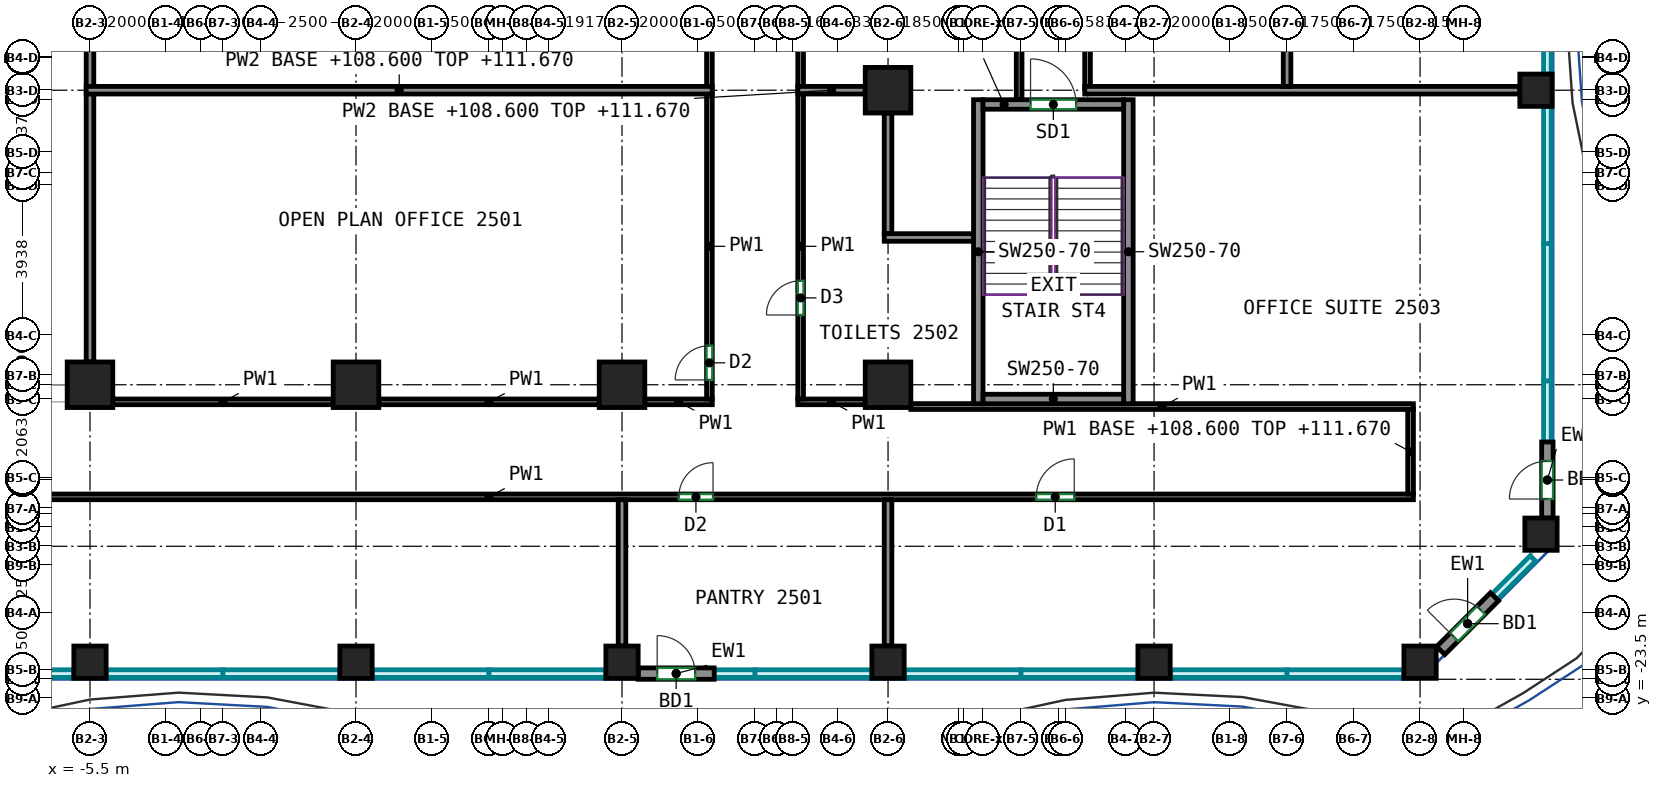
"""IFC4 building model, lengths in metres.
Left out: names, types, materials, properties, quantities, classifications, styles, units other than length and angle.
Written with IfcOpenShell. Run it as: python <this file> out.ifc"""

import sys

from ifc_helpers import new_model, si_unit, direction, frame, frame_2d, origin, origin_2d, place, context, subcontext, project, spatial, rectangle, extrude, source, transform, mapped, element, fill, save


model = new_model("IFC4")
c1 = context("Model", 3, precision=1e-05, world=origin(), true_north=direction((0.0, 1.0)))
c2 = subcontext(c1, "Body", "Model", "MODEL_VIEW")
j1 = project(units=[si_unit("LENGTHUNIT", "METRE"), si_unit("PLANEANGLEUNIT", "RADIAN")], contexts=[c1])
p1 = place(None, origin())
s1 = spatial("IfcSite", under=j1, at=p1, CompositionType="ELEMENT")
p2 = place(p1, origin())
s2 = spatial("IfcBuilding", under=s1, at=p2, CompositionType="ELEMENT")
p3 = place(p2, frame((0.0, 0.0, 108.6)))
s3 = spatial("IfcBuildingStorey", under=s2, at=p3, CompositionType="ELEMENT", Elevation=108.6)
m1 = source(origin(), c2, "Body", "SweptSolid", [
    extrude(rectangle(XDim=0.85, YDim=0.85, at=origin_2d()), origin(), (0.0, 0.0, 1.0), 3.72),
])
p4 = place(p3, frame((-5.5, -22.55, 0.0), z_axis=(0.0, 0.0, 1.0), x_axis=(1.0, 0.0, 0.0)))
e1 = element("IfcColumn", 1, at=p4, inside=s3, PredefinedType="COLUMN", context=c2, shape_type="MappedRepresentation", body=[
    mapped(m1, transform((0.0, 0.0, 0.0))),
])
m2 = source(origin(), c2, "Body", "SweptSolid", [
    extrude(rectangle(XDim=1.2, YDim=1.2, at=origin_2d()), origin(), (0.0, 0.0, 1.0), 3.72),
])
p5 = place(p3, frame((-5.5, -15.25, 0.0), z_axis=(0.0, 0.0, 1.0), x_axis=(1.0, 0.0, 0.0)))
e2 = element("IfcColumn", 2, at=p5, inside=s3, PredefinedType="COLUMN", context=c2, shape_type="MappedRepresentation", body=[
    mapped(m2, transform((0.0, 0.0, 0.0))),
])
p6 = place(p3, frame((1.5, -22.55, 0.0), z_axis=(0.0, 0.0, 1.0), x_axis=(1.0, 0.0, 0.0)))
e3 = element("IfcColumn", 3, at=p6, inside=s3, PredefinedType="COLUMN", context=c2, shape_type="MappedRepresentation", body=[
    mapped(m1, transform((0.0, 0.0, 0.0))),
])
p7 = place(p3, frame((1.5, -15.25, 0.0), z_axis=(0.0, 0.0, 1.0), x_axis=(1.0, 0.0, 0.0)))
e4 = element("IfcColumn", 4, at=p7, inside=s3, PredefinedType="COLUMN", context=c2, shape_type="MappedRepresentation", body=[
    mapped(m2, transform((0.0, 0.0, 0.0))),
])
p8 = place(p3, frame((8.5, -22.55, 0.0), z_axis=(0.0, 0.0, 1.0), x_axis=(1.0, 0.0, 0.0)))
e5 = element("IfcColumn", 5, at=p8, inside=s3, PredefinedType="COLUMN", context=c2, shape_type="MappedRepresentation", body=[
    mapped(m1, transform((0.0, 0.0, 0.0))),
])
p9 = place(p3, frame((8.5, -15.25, 0.0), z_axis=(0.0, 0.0, 1.0), x_axis=(1.0, 0.0, 0.0)))
e6 = element("IfcColumn", 6, at=p9, inside=s3, PredefinedType="COLUMN", context=c2, shape_type="MappedRepresentation", body=[
    mapped(m2, transform((0.0, 0.0, 0.0))),
])
p10 = place(p3, frame((15.5, -22.55, 0.0), z_axis=(0.0, 0.0, 1.0), x_axis=(1.0, 0.0, 0.0)))
e7 = element("IfcColumn", 7, at=p10, inside=s3, PredefinedType="COLUMN", context=c2, shape_type="MappedRepresentation", body=[
    mapped(m1, transform((0.0, 0.0, 0.0))),
])
for number, where, z_axis, x_axis in (
    (8, (15.5, -15.25, 0.0), (0.0, 0.0, 1.0), (1.0, 0.0, 0.0)),
    (9, (15.5, -7.5, 0.0), (0.0, 0.0, 1.0), (1.0, 0.0, 0.0)),
):
    element("IfcColumn", number, at=place(p3, frame(where, z_axis=z_axis, x_axis=x_axis)), inside=s3, PredefinedType="COLUMN", context=c2, shape_type="MappedRepresentation", body=[
        mapped(m2, transform((0.0, 0.0, 0.0))),
    ])
for number, where, z_axis, x_axis in (
    (10, (22.5, -22.55, 0.0), (0.0, 0.0, 1.0), (1.0, 0.0, 0.0)),
    (11, (29.5, -22.55, 0.0), (0.0, 0.0, 1.0), (1.0, 0.0, 0.0)),
    (12, (32.55, -7.5, 0.0), (0.0, 0.0, 1.0), (1.0, 0.0, 0.0)),
    (13, (32.682, -19.182, 0.0), (0.0, 0.0, 1.0), (1.0, 0.0, 0.0)),
):
    element("IfcColumn", number, at=place(p3, frame(where, z_axis=z_axis, x_axis=x_axis)), inside=s3, PredefinedType="COLUMN", context=c2, shape_type="MappedRepresentation", body=[
        mapped(m1, transform((0.0, 0.0, 0.0))),
    ])
m3 = source(origin(), c2, "Body", "SweptSolid", [
    extrude(rectangle(XDim=8.0, YDim=0.25, at=frame_2d((4.0, 0.0))), origin(), (0.0, 0.0, 1.0), 3.72),
])
for number, where, z_axis, x_axis in (
    (14, (17.875, -15.75, 0.0), (0.0, 0.0, 1.0), (0.0, 1.0, 0.0)),
    (15, (21.825, -15.75, 0.0), (0.0, 0.0, 1.0), (0.0, 1.0, 0.0)),
):
    element("IfcWall", number, at=place(p3, frame(where, z_axis=z_axis, x_axis=x_axis)), inside=s3, PredefinedType="SHEAR", context=c2, shape_type="MappedRepresentation", body=[
        mapped(m3, transform((0.0, 0.0, 0.0))),
    ])
m4 = source(origin(), c2, "Body", "SweptSolid", [
    extrude(rectangle(XDim=3.7, YDim=0.25, at=frame_2d((1.85, 0.0))), origin(), (0.0, 0.0, 1.0), 3.72),
])
p11 = place(p3, frame((18.0, -15.625, 0.0), z_axis=(0.0, 0.0, 1.0), x_axis=(1.0, 0.0, 0.0)))
e16 = element("IfcWall", 16, at=p11, inside=s3, PredefinedType="SHEAR", context=c2, shape_type="MappedRepresentation", body=[
    mapped(m4, transform((0.0, 0.0, 0.0))),
])
p12 = place(p3, frame((18.0, -7.875, 0.0), z_axis=(0.0, 0.0, 1.0), x_axis=(1.0, 0.0, 0.0)))
e17 = element("IfcWall", 17, at=p12, inside=s3, PredefinedType="SHEAR", context=c2, shape_type="MappedRepresentation", body=[
    mapped(m4, transform((0.0, 0.0, 0.0))),
])
p13 = place(p12, frame((1.25, 0.0, 0.0)))
e18 = element("IfcOpeningElement", 18, at=p13, cuts=e17, PredefinedType="OPENING", context=c2, shape_type="SweptSolid", body=[
    extrude(rectangle(XDim=1.2, YDim=2.1, at=frame_2d((0.6, 1.05))), frame((0.0, 0.135, 0.0), z_axis=(0.0, -1.0, 0.0), x_axis=(1.0, 0.0, 0.0)), (0.0, 0.0, 1.0), 0.27),
])
m5 = source(origin(), c2, "Body", "SweptSolid", [
    extrude(rectangle(XDim=2.0, YDim=0.3, at=frame_2d((1.0, 0.0))), origin(), (0.0, 0.0, 1.0), 3.72),
])
p14 = place(p3, frame((8.925, -22.85, 0.0), z_axis=(0.0, 0.0, 1.0), x_axis=(1.0, 0.0, 0.0)))
e19 = element("IfcWall", 19, at=p14, inside=s3, PredefinedType="SOLIDWALL", context=c2, shape_type="MappedRepresentation", body=[
    mapped(m5, transform((0.0, 0.0, 0.0))),
])
p15 = place(p14, frame((0.5, 0.0, 0.0)))
e20 = element("IfcOpeningElement", 20, at=p15, cuts=e19, PredefinedType="OPENING", context=c2, shape_type="SweptSolid", body=[
    extrude(rectangle(XDim=1.0, YDim=2.1, at=frame_2d((0.5, 1.05))), frame((0.0, 0.16, 0.0), z_axis=(0.0, -1.0, 0.0), x_axis=(1.0, 0.0, 0.0)), (0.0, 0.0, 1.0), 0.32),
])
p16 = place(p3, frame((30.044, -22.244, 0.0), z_axis=(0.0, 0.0, 1.0), x_axis=(0.707045742145, 0.70716781496, 0.0)))
e21 = element("IfcWall", 21, at=p16, inside=s3, PredefinedType="SOLIDWALL", context=c2, shape_type="MappedRepresentation", body=[
    mapped(m5, transform((0.0, 0.0, 0.0))),
])
p17 = place(p16, frame((0.5, 0.0, 0.0)))
e22 = element("IfcOpeningElement", 22, at=p17, cuts=e21, PredefinedType="OPENING", context=c2, shape_type="SweptSolid", body=[
    extrude(rectangle(XDim=1.0, YDim=2.1, at=frame_2d((0.5, 1.05))), frame((0.0, 0.16, 0.0), z_axis=(0.0, -1.0, 0.0), x_axis=(1.0, 0.0, 0.0)), (0.0, 0.0, 1.0), 0.32),
])
p18 = place(p3, frame((32.85, -18.757, 0.0), z_axis=(0.0, 0.0, 1.0), x_axis=(0.0, 1.0, 0.0)))
e23 = element("IfcWall", 23, at=p18, inside=s3, PredefinedType="SOLIDWALL", context=c2, shape_type="MappedRepresentation", body=[
    mapped(m5, transform((0.0, 0.0, 0.0))),
])
p19 = place(p18, frame((0.5, 0.0, 0.0)))
e24 = element("IfcOpeningElement", 24, at=p19, cuts=e23, PredefinedType="OPENING", context=c2, shape_type="SweptSolid", body=[
    extrude(rectangle(XDim=1.0, YDim=2.1, at=frame_2d((0.5, 1.05))), frame((0.0, 0.16, 0.0), z_axis=(0.0, -1.0, 0.0), x_axis=(1.0, 0.0, 0.0)), (0.0, 0.0, 1.0), 0.32),
])
p20 = place(p3, frame((-19.325, -18.2, 0.0), z_axis=(0.0, 0.0, 1.0), x_axis=(1.0, 0.0, 0.0)))
e25 = element("IfcWall", 25, at=p20, inside=s3, PredefinedType="PARTITIONING", context=c2, shape_type="SweptSolid", body=[
    extrude(rectangle(XDim=48.65, YDim=0.15, at=frame_2d((24.325, 0.0))), origin(), (0.0, 0.0, 1.0), 3.72),
])
p21 = place(p20, frame((6.208, 0.0, 0.0)))
e26 = element("IfcOpeningElement", 26, at=p21, cuts=e25, PredefinedType="OPENING", context=c2, shape_type="SweptSolid", body=[
    extrude(rectangle(XDim=1.8, YDim=2.1, at=frame_2d((0.9, 1.05))), frame((0.0, 0.085, 0.0), z_axis=(0.0, -1.0, 0.0), x_axis=(1.0, 0.0, 0.0)), (0.0, 0.0, 1.0), 0.17),
])
p22 = place(p20, frame((29.32, 0.0, 0.0)))
e27 = element("IfcOpeningElement", 27, at=p22, cuts=e25, PredefinedType="OPENING", context=c2, shape_type="SweptSolid", body=[
    extrude(rectangle(XDim=0.9, YDim=2.1, at=frame_2d((0.45, 1.05))), frame((0.0, 0.085, 0.0), z_axis=(0.0, -1.0, 0.0), x_axis=(1.0, 0.0, 0.0)), (0.0, 0.0, 1.0), 0.17),
])
p23 = place(p20, frame((38.725, 0.0, 0.0)))
e28 = element("IfcOpeningElement", 28, at=p23, cuts=e25, PredefinedType="OPENING", context=c2, shape_type="SweptSolid", body=[
    extrude(rectangle(XDim=1.0, YDim=2.1, at=frame_2d((0.5, 1.05))), frame((0.0, 0.085, 0.0), z_axis=(0.0, -1.0, 0.0), x_axis=(1.0, 0.0, 0.0)), (0.0, 0.0, 1.0), 0.17),
])
for number, where, z_axis, x_axis in (
    (29, (-4.9, -15.7, 0.0), (0.0, 0.0, 1.0), (1.0, 0.0, 0.0)),
    (30, (2.1, -15.7, 0.0), (0.0, 0.0, 1.0), (1.0, 0.0, 0.0)),
):
    element("IfcWall", number, at=place(p3, frame(where, z_axis=z_axis, x_axis=x_axis)), inside=s3, PredefinedType="PARTITIONING", context=c2, shape_type="SweptSolid", body=[
        extrude(rectangle(XDim=5.8, YDim=0.15, at=frame_2d((2.9, 0.0))), origin(), (0.0, 0.0, 1.0), 3.72),
    ])
p24 = place(p3, frame((9.1, -15.7, 0.0), z_axis=(0.0, 0.0, 1.0), x_axis=(1.0, 0.0, 0.0)))
e31 = element("IfcWall", 31, at=p24, inside=s3, PredefinedType="PARTITIONING", context=c2, shape_type="SweptSolid", body=[
    extrude(rectangle(XDim=1.775, YDim=0.15, at=frame_2d((0.887, 0.0))), origin(), (0.0, 0.0, 1.0), 3.72),
])
p25 = place(p3, frame((10.8, -15.625, 0.0), z_axis=(0.0, 0.0, 1.0), x_axis=(0.0, 1.0, 0.0)))
e32 = element("IfcWall", 32, at=p25, inside=s3, PredefinedType="PARTITIONING", context=c2, shape_type="SweptSolid", body=[
    extrude(rectangle(XDim=8.035, YDim=0.15, at=frame_2d((4.018, 0.0))), origin(), (0.0, 0.0, 1.0), 3.72),
])
p26 = place(p25, frame((0.502, 0.0, 0.0)))
e33 = element("IfcOpeningElement", 33, at=p26, cuts=e32, PredefinedType="OPENING", context=c2, shape_type="SweptSolid", body=[
    extrude(rectangle(XDim=0.9, YDim=2.1, at=frame_2d((0.45, 1.05))), frame((0.0, 0.085, 0.0), z_axis=(0.0, -1.0, 0.0), x_axis=(1.0, 0.0, 0.0)), (0.0, 0.0, 1.0), 0.17),
])
p27 = place(p3, frame((10.8, -7.41, 0.0), z_axis=(0.0, 0.0, 1.0), x_axis=(0.0, 1.0, 0.0)))
e34 = element("IfcWall", 34, at=p27, inside=s3, PredefinedType="PARTITIONING", context=c2, shape_type="SweptSolid", body=[
    extrude(rectangle(XDim=10.285, YDim=0.15, at=frame_2d((5.143, 0.0))), origin(), (0.0, 0.0, 1.0), 3.72),
])
p28 = place(p27, frame((6.56, 0.0, 0.0)))
e35 = element("IfcOpeningElement", 35, at=p28, cuts=e34, PredefinedType="OPENING", context=c2, shape_type="SweptSolid", body=[
    extrude(rectangle(XDim=0.9, YDim=2.1, at=frame_2d((0.45, 1.05))), frame((0.0, 0.085, 0.0), z_axis=(0.0, -1.0, 0.0), x_axis=(1.0, 0.0, 0.0)), (0.0, 0.0, 1.0), 0.17),
])
p29 = place(p3, frame((13.125, -15.7, 0.0), z_axis=(0.0, 0.0, 1.0), x_axis=(1.0, 0.0, 0.0)))
e36 = element("IfcWall", 36, at=p29, inside=s3, PredefinedType="PARTITIONING", context=c2, shape_type="SweptSolid", body=[
    extrude(rectangle(XDim=1.775, YDim=0.15, at=frame_2d((0.887, 0.0))), origin(), (0.0, 0.0, 1.0), 3.72),
])
p30 = place(p3, frame((16.1, -15.825, 0.0), z_axis=(0.0, 0.0, 1.0), x_axis=(1.0, 0.0, 0.0)))
e37 = element("IfcWall", 37, at=p30, inside=s3, PredefinedType="PARTITIONING", context=c2, shape_type="SweptSolid", body=[
    extrude(rectangle(XDim=13.225, YDim=0.15, at=frame_2d((6.612, 0.0))), origin(), (0.0, 0.0, 1.0), 3.72),
])
p31 = place(p3, frame((13.2, -15.625, 0.0), z_axis=(0.0, 0.0, 1.0), x_axis=(0.0, 1.0, 0.0)))
e38 = element("IfcWall", 38, at=p31, inside=s3, PredefinedType="PARTITIONING", context=c2, shape_type="SweptSolid", body=[
    extrude(rectangle(XDim=8.035, YDim=0.15, at=frame_2d((4.018, 0.0))), origin(), (0.0, 0.0, 1.0), 3.72),
])
p32 = place(p31, frame((2.21, 0.0, 0.0)))
e39 = element("IfcOpeningElement", 39, at=p32, cuts=e38, PredefinedType="OPENING", context=c2, shape_type="SweptSolid", body=[
    extrude(rectangle(XDim=0.9, YDim=2.1, at=frame_2d((0.45, 1.05))), frame((0.0, 0.085, 0.0), z_axis=(0.0, -1.0, 0.0), x_axis=(1.0, 0.0, 0.0)), (0.0, 0.0, 1.0), 0.17),
])
p33 = place(p3, frame((29.25, -18.125, 0.0), z_axis=(0.0, 0.0, 1.0), x_axis=(0.0, 1.0, 0.0)))
e40 = element("IfcWall", 40, at=p33, inside=s3, PredefinedType="PARTITIONING", context=c2, shape_type="SweptSolid", body=[
    extrude(rectangle(XDim=2.225, YDim=0.15, at=frame_2d((1.113, 0.0))), origin(), (0.0, 0.0, 1.0), 3.07),
])
p34 = place(p3, frame((18.95, 4.05, 0.0), z_axis=(0.0, 0.0, 1.0), x_axis=(0.0, -1.0, 0.0)))
e41 = element("IfcWall", 41, at=p34, inside=s3, PredefinedType="PARTITIONING", context=c2, shape_type="SweptSolid", body=[
    extrude(rectangle(XDim=11.8, YDim=0.15, at=frame_2d((5.9, 0.0))), origin(), (0.0, 0.0, 1.0), 3.72),
])
p35 = place(p34, frame((0.4, 0.0, 0.0)))
e42 = element("IfcOpeningElement", 42, at=p35, cuts=e41, PredefinedType="OPENING", context=c2, shape_type="SweptSolid", body=[
    extrude(rectangle(XDim=0.9, YDim=2.1, at=frame_2d((0.45, 1.05))), frame((0.0, 0.085, 0.0), z_axis=(0.0, -1.0, 0.0), x_axis=(1.0, 0.0, 0.0)), (0.0, 0.0, 1.0), 0.17),
])
p36 = place(p3, frame((13.2, -7.41, 0.0), z_axis=(0.0, 0.0, 1.0), x_axis=(0.0, 1.0, 0.0)))
e43 = element("IfcWall", 43, at=p36, inside=s3, PredefinedType="PARTITIONING", context=c2, shape_type="SweptSolid", body=[
    extrude(rectangle(XDim=10.285, YDim=0.15, at=frame_2d((5.143, 0.0))), origin(), (0.0, 0.0, 1.0), 3.72),
])
p37 = place(p3, frame((20.75, -7.41, 0.0), z_axis=(0.0, 0.0, 1.0), x_axis=(0.0, 1.0, 0.0)))
e44 = element("IfcWall", 44, at=p37, inside=s3, PredefinedType="PARTITIONING", context=c2, shape_type="SweptSolid", body=[
    extrude(rectangle(XDim=7.57, YDim=0.15, at=frame_2d((3.785, 0.0))), origin(), (0.0, 0.0, 1.0), 3.72),
])
p38 = place(p37, frame((5.56, 0.0, 0.0)))
e45 = element("IfcOpeningElement", 45, at=p38, cuts=e44, PredefinedType="OPENING", context=c2, shape_type="SweptSolid", body=[
    extrude(rectangle(XDim=0.9, YDim=2.1, at=frame_2d((0.45, 1.05))), frame((0.0, 0.085, 0.0), z_axis=(0.0, -1.0, 0.0), x_axis=(1.0, 0.0, 0.0)), (0.0, 0.0, 1.0), 0.17),
])
p39 = place(p3, frame((-5.5, -14.65, 0.0), z_axis=(0.0, 0.0, 1.0), x_axis=(0.0, 1.0, 0.0)))
e46 = element("IfcWall", 46, at=p39, inside=s3, PredefinedType="PARTITIONING", context=c2, shape_type="SweptSolid", body=[
    extrude(rectangle(XDim=7.06, YDim=0.2, at=frame_2d((3.53, 0.0))), origin(), (0.0, 0.0, 1.0), 3.72),
])
p40 = place(p3, frame((-5.5, -7.41, 0.0), z_axis=(0.0, 0.0, 1.0), x_axis=(0.0, 1.0, 0.0)))
e47 = element("IfcWall", 47, at=p40, inside=s3, PredefinedType="PARTITIONING", context=c2, shape_type="SweptSolid", body=[
    extrude(rectangle(XDim=3.685, YDim=0.2, at=frame_2d((1.842, 0.0))), origin(), (0.0, 0.0, 1.0), 3.72),
])
for number, where, z_axis, x_axis in (
    (48, (8.5, -22.125, 0.0), (0.0, 0.0, 1.0), (0.0, 1.0, 0.0)),
    (49, (15.5, -22.125, 0.0), (0.0, 0.0, 1.0), (0.0, 1.0, 0.0)),
):
    element("IfcWall", number, at=place(p3, frame(where, z_axis=z_axis, x_axis=x_axis)), inside=s3, PredefinedType="PARTITIONING", context=c2, shape_type="SweptSolid", body=[
        extrude(rectangle(XDim=3.849, YDim=0.2, at=frame_2d((1.925, 0.0))), origin(), (0.0, 0.0, 1.0), 3.72),
    ])
p41 = place(p3, frame((-5.6, -7.5, 0.0), z_axis=(0.0, 0.0, 1.0), x_axis=(1.0, 0.0, 0.0)))
e50 = element("IfcWall", 50, at=p41, inside=s3, PredefinedType="PARTITIONING", context=c2, shape_type="SweptSolid", body=[
    extrude(rectangle(XDim=16.474, YDim=0.2, at=frame_2d((8.237, 0.0))), origin(), (0.0, 0.0, 1.0), 3.07),
])
p42 = place(p3, frame((13.126, -7.5, 0.0), z_axis=(0.0, 0.0, 1.0), x_axis=(1.0, 0.0, 0.0)))
e51 = element("IfcWall", 51, at=p42, inside=s3, PredefinedType="PARTITIONING", context=c2, shape_type="SweptSolid", body=[
    extrude(rectangle(XDim=1.774, YDim=0.2, at=frame_2d((0.887, 0.0))), origin(), (0.0, 0.0, 1.0), 3.07),
])
p43 = place(p3, frame((15.5, -11.275, 0.0), z_axis=(0.0, 0.0, 1.0), x_axis=(0.0, 1.0, 0.0)))
e52 = element("IfcWall", 52, at=p43, inside=s3, PredefinedType="PARTITIONING", context=c2, shape_type="SweptSolid", body=[
    extrude(rectangle(XDim=3.175, YDim=0.2, at=frame_2d((1.587, 0.0))), origin(), (0.0, 0.0, 1.0), 3.72),
])
p44 = place(p3, frame((17.75, -11.375, 0.0), z_axis=(0.0, 0.0, 1.0), x_axis=(-1.0, 0.0, 0.0)))
e53 = element("IfcWall", 53, at=p44, inside=s3, PredefinedType="PARTITIONING", context=c2, shape_type="SweptSolid", body=[
    extrude(rectangle(XDim=2.35, YDim=0.2, at=frame_2d((1.175, 0.0))), origin(), (0.0, 0.0, 1.0), 3.72),
])
p45 = place(p3, frame((20.676, -7.5, 0.0), z_axis=(0.0, 0.0, 1.0), x_axis=(1.0, 0.0, 0.0)))
e54 = element("IfcWall", 54, at=p45, inside=s3, PredefinedType="PARTITIONING", context=c2, shape_type="SweptSolid", body=[
    extrude(rectangle(XDim=11.449, YDim=0.2, at=frame_2d((5.725, 0.0))), origin(), (0.0, 0.0, 1.0), 3.72),
])
p46 = place(p3, frame((26.0, -7.4, 0.0), z_axis=(0.0, 0.0, 1.0), x_axis=(0.0, 1.0, 0.0)))
e55 = element("IfcWall", 55, at=p46, inside=s3, PredefinedType="PARTITIONING", context=c2, shape_type="SweptSolid", body=[
    extrude(rectangle(XDim=7.55, YDim=0.2, at=frame_2d((3.775, 0.0))), origin(), (0.0, 0.0, 1.0), 3.72),
])
p47 = place(p15, origin())
e56 = element("IfcDoor", 56, at=p47, inside=s3, OperationType="SINGLE_SWING_LEFT", PredefinedType="DOOR", context=c2, shape_type="SweptSolid", body=[
    extrude(rectangle(XDim=1.0, YDim=2.1, at=frame_2d((0.5, 1.05))), frame((0.0, 0.025, 0.0), z_axis=(0.0, -1.0, 0.0), x_axis=(1.0, 0.0, 0.0)), (0.0, 0.0, 1.0), 0.05),
])
fill(e20, e56)
p48 = place(p17, origin())
e57 = element("IfcDoor", 57, at=p48, inside=s3, OperationType="SINGLE_SWING_LEFT", PredefinedType="DOOR", context=c2, shape_type="SweptSolid", body=[
    extrude(rectangle(XDim=1.0, YDim=2.1, at=frame_2d((0.5, 1.05))), frame((0.0, 0.025, 0.0), z_axis=(0.0, -1.0, 0.0), x_axis=(1.0, 0.0, 0.0)), (0.0, 0.0, 1.0), 0.05),
])
fill(e22, e57)
p49 = place(p19, origin())
e58 = element("IfcDoor", 58, at=p49, inside=s3, OperationType="SINGLE_SWING_LEFT", PredefinedType="DOOR", context=c2, shape_type="SweptSolid", body=[
    extrude(rectangle(XDim=1.0, YDim=2.1, at=frame_2d((0.5, 1.05))), frame((0.0, 0.025, 0.0), z_axis=(0.0, -1.0, 0.0), x_axis=(1.0, 0.0, 0.0)), (0.0, 0.0, 1.0), 0.05),
])
fill(e24, e58)
p50 = place(p13, origin())
e59 = element("IfcDoor", 59, at=p50, inside=s3, OperationType="DOUBLE_DOOR_SINGLE_SWING", PredefinedType="DOOR", context=c2, shape_type="SweptSolid", body=[
    extrude(rectangle(XDim=1.2, YDim=2.1, at=frame_2d((0.6, 1.05))), frame((0.0, 0.025, 0.0), z_axis=(0.0, -1.0, 0.0), x_axis=(1.0, 0.0, 0.0)), (0.0, 0.0, 1.0), 0.05),
])
fill(e18, e59)
p51 = place(p22, origin())
e60 = element("IfcDoor", 60, at=p51, inside=s3, OperationType="SINGLE_SWING_RIGHT", PredefinedType="DOOR", context=c2, shape_type="SweptSolid", body=[
    extrude(rectangle(XDim=0.9, YDim=2.1, at=frame_2d((0.45, 1.05))), frame((0.0, 0.025, 0.0), z_axis=(0.0, -1.0, 0.0), x_axis=(1.0, 0.0, 0.0)), (0.0, 0.0, 1.0), 0.05),
])
fill(e27, e60)
p52 = place(p23, origin())
e61 = element("IfcDoor", 61, at=p52, inside=s3, OperationType="SINGLE_SWING_RIGHT", PredefinedType="DOOR", context=c2, shape_type="SweptSolid", body=[
    extrude(rectangle(XDim=1.0, YDim=2.1, at=frame_2d((0.5, 1.05))), frame((0.0, 0.025, 0.0), z_axis=(0.0, -1.0, 0.0), x_axis=(1.0, 0.0, 0.0)), (0.0, 0.0, 1.0), 0.05),
])
fill(e28, e61)
p53 = place(p26, origin())
e62 = element("IfcDoor", 62, at=p53, inside=s3, OperationType="SINGLE_SWING_LEFT", PredefinedType="DOOR", context=c2, shape_type="SweptSolid", body=[
    extrude(rectangle(XDim=0.9, YDim=2.1, at=frame_2d((0.45, 1.05))), frame((0.0, 0.025, 0.0), z_axis=(0.0, -1.0, 0.0), x_axis=(1.0, 0.0, 0.0)), (0.0, 0.0, 1.0), 0.05),
])
fill(e33, e62)
p54 = place(p32, origin())
e63 = element("IfcDoor", 63, at=p54, inside=s3, OperationType="SINGLE_SWING_LEFT", PredefinedType="DOOR", context=c2, shape_type="SweptSolid", body=[
    extrude(rectangle(XDim=0.9, YDim=2.1, at=frame_2d((0.45, 1.05))), frame((0.0, 0.025, 0.0), z_axis=(0.0, -1.0, 0.0), x_axis=(1.0, 0.0, 0.0)), (0.0, 0.0, 1.0), 0.05),
])
fill(e39, e63)
save(model, sys.argv[1])
